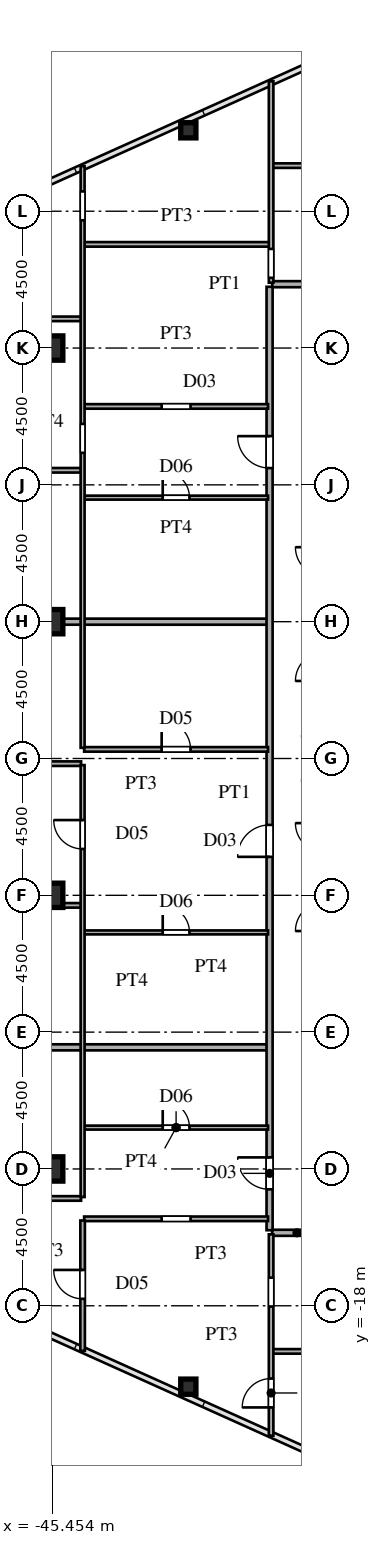
"""IFC4 building model, lengths in metres.
Left out: names, types, materials, properties, quantities, classifications, styles, units other than length and angle.
Written with IfcOpenShell. Run it as: python <this file> out.ifc"""

import sys

from ifc_helpers import new_model, si_unit, direction, frame, frame_2d, origin, origin_2d, place, context, subcontext, project, spatial, rectangle, hollow_rectangle, i_section, extrude, source, transform, mapped, element, fill, save


model = new_model("IFC4")
c1 = context("Model", 3, precision=1e-05, world=origin(), true_north=direction((0.0, 1.0)))
c2 = subcontext(c1, "Body", "Model", "MODEL_VIEW")
j1 = project(units=[si_unit("LENGTHUNIT", "METRE"), si_unit("PLANEANGLEUNIT", "RADIAN")], contexts=[c1])
p1 = place(None, origin())
s1 = spatial("IfcSite", under=j1, at=p1, CompositionType="ELEMENT")
p2 = place(p1, origin())
s2 = spatial("IfcBuilding", under=s1, at=p2, CompositionType="ELEMENT")
p3 = place(p2, frame((0.0, 0.0, 69.3)))
s3 = spatial("IfcBuildingStorey", under=s2, at=p3, CompositionType="ELEMENT", Elevation=69.3)
m1 = source(origin(), c2, "Body", "SweptSolid", [
    extrude(i_section(OverallWidth=0.8, OverallDepth=0.8, WebThickness=0.032, FlangeThickness=0.05, at=origin_2d()), origin(), (0.0, 0.0, 1.0), 3.6),
])
for number, where, z_axis, x_axis in (
    (1, (-45.5, -13.5, 0.0), (0.0, 0.0, 1.0), (1.0, 0.0, 0.0)),
    (2, (-45.5, -4.5, 0.0), (0.0, 0.0, 1.0), (1.0, 0.0, 0.0)),
    (3, (-45.5, 4.5, 0.0), (0.0, 0.0, 1.0), (1.0, 0.0, 0.0)),
    (4, (-45.5, 13.5, 0.0), (0.0, 0.0, 1.0), (1.0, 0.0, 0.0)),
):
    element("IfcColumn", number, at=place(p3, frame(where, z_axis=z_axis, x_axis=x_axis)), inside=s3, PredefinedType="COLUMN", context=c2, shape_type="MappedRepresentation", body=[
        mapped(m1, transform((0.0, 0.0, 0.0), scale=1.0)),
    ])
m2 = source(origin(), c2, "Body", "SweptSolid", [
    extrude(hollow_rectangle(XDim=0.5, YDim=0.5, WallThickness=0.02, at=origin_2d()), origin(), (0.0, 0.0, 1.0), 3.6),
])
for number, where, z_axis, x_axis in (
    (5, (-40.973, -20.661, 0.0), (0.0, 0.0, 1.0), (1.0, 0.0, 0.0)),
    (6, (-40.973, 20.661, 0.0), (0.0, 0.0, 1.0), (1.0, 0.0, 0.0)),
):
    element("IfcColumn", number, at=place(p3, frame(where, z_axis=z_axis, x_axis=x_axis)), inside=s3, PredefinedType="COLUMN", context=c2, shape_type="MappedRepresentation", body=[
        mapped(m2, transform((0.0, 0.0, 0.0), scale=1.0)),
    ])
p4 = place(p3, frame((-38.2, -19.5, 0.0), z_axis=(0.0, 0.0, 1.0), x_axis=(1.0, 0.0, 0.0)))
e7 = element("IfcWall", 7, at=p4, inside=s3, PredefinedType="PARTITIONING", context=c2, shape_type="SweptSolid", body=[
    extrude(rectangle(XDim=10.735, YDim=0.15, at=frame_2d((5.367, 0.0))), origin(), (0.0, 0.0, 1.0), 3.38),
])
p5 = place(p3, frame((-38.215, -15.6, 0.0), z_axis=(0.0, 0.0, 1.0), x_axis=(1.0, 0.0, 0.0)))
e8 = element("IfcWall", 8, at=p5, inside=s3, PredefinedType="PARTITIONING", context=c2, shape_type="SweptSolid", body=[
    extrude(rectangle(XDim=1.63, YDim=0.2, at=frame_2d((0.815, 0.0))), origin(), (0.0, 0.0, 1.0), 3.38),
])
p6 = place(p3, frame((-44.4, -15.14, 0.0), z_axis=(0.0, 0.0, 1.0), x_axis=(1.0, 0.0, 0.0)))
e9 = element("IfcWall", 9, at=p6, inside=s3, PredefinedType="PARTITIONING", context=c2, shape_type="SweptSolid", body=[
    extrude(rectangle(XDim=6.05, YDim=0.15, at=frame_2d((3.025, 0.0))), origin(), (0.0, 0.0, 1.0), 3.38),
])
p7 = place(p6, frame((2.55, 0.0, 0.0)))
e10 = element("IfcOpeningElement", 10, at=p7, cuts=e9, PredefinedType="OPENING", context=c2, shape_type="SweptSolid", body=[
    extrude(rectangle(XDim=0.95, YDim=2.15, at=frame_2d((0.475, 1.075))), frame((0.0, 0.085, 0.0), z_axis=(0.0, -1.0, 0.0), x_axis=(1.0, 0.0, 0.0)), (0.0, 0.0, 1.0), 0.17),
])
p8 = place(p3, frame((-54.45, -14.47, 0.0), z_axis=(0.0, 0.0, 1.0), x_axis=(1.0, 0.0, 0.0)))
e11 = element("IfcWall", 11, at=p8, inside=s3, PredefinedType="PARTITIONING", context=c2, shape_type="SweptSolid", body=[
    extrude(rectangle(XDim=9.95, YDim=0.15, at=frame_2d((4.975, 0.0))), origin(), (0.0, 0.0, 1.0), 3.38),
])
p9 = place(p8, frame((4.5, 0.0, 0.0)))
e12 = element("IfcOpeningElement", 12, at=p9, cuts=e11, PredefinedType="OPENING", context=c2, shape_type="SweptSolid", body=[
    extrude(rectangle(XDim=0.95, YDim=2.15, at=frame_2d((0.475, 1.075))), frame((0.0, 0.085, 0.0), z_axis=(0.0, -1.0, 0.0), x_axis=(1.0, 0.0, 0.0)), (0.0, 0.0, 1.0), 0.17),
])
p10 = place(p3, frame((-44.4, -12.14, 0.0), z_axis=(0.0, 0.0, 1.0), x_axis=(1.0, 0.0, 0.0)))
e13 = element("IfcWall", 13, at=p10, inside=s3, PredefinedType="PARTITIONING", context=c2, shape_type="SweptSolid", body=[
    extrude(rectangle(XDim=6.05, YDim=0.13, at=frame_2d((3.025, 0.0))), origin(), (0.0, 0.0, 1.0), 3.38),
])
p11 = place(p10, frame((2.585, 0.0, 0.0)))
e14 = element("IfcOpeningElement", 14, at=p11, cuts=e13, PredefinedType="OPENING", context=c2, shape_type="SweptSolid", body=[
    extrude(rectangle(XDim=0.88, YDim=2.1, at=frame_2d((0.44, 1.05))), frame((0.0, 0.075, 0.0), z_axis=(0.0, -1.0, 0.0), x_axis=(1.0, 0.0, 0.0)), (0.0, 0.0, 1.0), 0.15),
])
p12 = place(p3, frame((-66.568, -9.5, 0.0), z_axis=(0.0, 0.0, 1.0), x_axis=(1.0, 0.0, 0.0)))
e15 = element("IfcWall", 15, at=p12, inside=s3, PredefinedType="PARTITIONING", context=c2, shape_type="SweptSolid", body=[
    extrude(rectangle(XDim=28.188, YDim=0.2, at=frame_2d((14.094, 0.0))), origin(), (0.0, 0.0, 1.0), 3.38),
])
p13 = place(p3, frame((-44.4, -5.72, 0.0), z_axis=(0.0, 0.0, 1.0), x_axis=(1.0, 0.0, 0.0)))
e16 = element("IfcWall", 16, at=p13, inside=s3, PredefinedType="PARTITIONING", context=c2, shape_type="SweptSolid", body=[
    extrude(rectangle(XDim=6.05, YDim=0.13, at=frame_2d((3.025, 0.0))), origin(), (0.0, 0.0, 1.0), 3.38),
])
p14 = place(p13, frame((2.585, 0.0, 0.0)))
e17 = element("IfcOpeningElement", 17, at=p14, cuts=e16, PredefinedType="OPENING", context=c2, shape_type="SweptSolid", body=[
    extrude(rectangle(XDim=0.88, YDim=2.1, at=frame_2d((0.44, 1.05))), frame((0.0, 0.075, 0.0), z_axis=(0.0, -1.0, 0.0), x_axis=(1.0, 0.0, 0.0)), (0.0, 0.0, 1.0), 0.15),
])
p15 = place(p3, frame((-71.035, -4.83, 0.0), z_axis=(0.0, 0.0, 1.0), x_axis=(1.0, 0.0, 0.0)))
e18 = element("IfcWall", 18, at=p15, inside=s3, PredefinedType="PARTITIONING", context=c2, shape_type="SweptSolid", body=[
    extrude(rectangle(XDim=26.535, YDim=0.15, at=frame_2d((13.268, 0.0))), origin(), (0.0, 0.0, 1.0), 3.38),
])
p16 = place(p15, frame((21.085, 0.0, 0.0)))
e19 = element("IfcOpeningElement", 19, at=p16, cuts=e18, PredefinedType="OPENING", context=c2, shape_type="SweptSolid", body=[
    extrude(rectangle(XDim=0.95, YDim=2.15, at=frame_2d((0.475, 1.075))), frame((0.0, 0.085, 0.0), z_axis=(0.0, -1.0, 0.0), x_axis=(1.0, 0.0, 0.0)), (0.0, 0.0, 1.0), 0.17),
])
p17 = place(p15, frame((13.21, 0.0, 0.0)))
e20 = element("IfcOpeningElement", 20, at=p17, cuts=e18, PredefinedType="OPENING", context=c2, shape_type="SweptSolid", body=[
    extrude(rectangle(XDim=0.95, YDim=2.15, at=frame_2d((0.475, 1.075))), frame((0.0, 0.085, 0.0), z_axis=(0.0, -1.0, 0.0), x_axis=(1.0, 0.0, 0.0)), (0.0, 0.0, 1.0), 0.17),
])
p18 = place(p3, frame((-71.035, -0.17, 0.0), z_axis=(0.0, 0.0, 1.0), x_axis=(1.0, 0.0, 0.0)))
e21 = element("IfcWall", 21, at=p18, inside=s3, PredefinedType="PARTITIONING", context=c2, shape_type="SweptSolid", body=[
    extrude(rectangle(XDim=26.535, YDim=0.15, at=frame_2d((13.268, 0.0))), origin(), (0.0, 0.0, 1.0), 3.38),
])
p19 = place(p18, frame((21.085, 0.0, 0.0)))
e22 = element("IfcOpeningElement", 22, at=p19, cuts=e21, PredefinedType="OPENING", context=c2, shape_type="SweptSolid", body=[
    extrude(rectangle(XDim=0.95, YDim=2.15, at=frame_2d((0.475, 1.075))), frame((0.0, 0.085, 0.0), z_axis=(0.0, -1.0, 0.0), x_axis=(1.0, 0.0, 0.0)), (0.0, 0.0, 1.0), 0.17),
])
p20 = place(p18, frame((13.21, 0.0, 0.0)))
e23 = element("IfcOpeningElement", 23, at=p20, cuts=e21, PredefinedType="OPENING", context=c2, shape_type="SweptSolid", body=[
    extrude(rectangle(XDim=0.95, YDim=2.15, at=frame_2d((0.475, 1.075))), frame((0.0, 0.085, 0.0), z_axis=(0.0, -1.0, 0.0), x_axis=(1.0, 0.0, 0.0)), (0.0, 0.0, 1.0), 0.17),
])
p21 = place(p3, frame((-44.4, 0.3, 0.0), z_axis=(0.0, 0.0, 1.0), x_axis=(1.0, 0.0, 0.0)))
e24 = element("IfcWall", 24, at=p21, inside=s3, PredefinedType="PARTITIONING", context=c2, shape_type="SweptSolid", body=[
    extrude(rectangle(XDim=6.05, YDim=0.15, at=frame_2d((3.025, 0.0))), origin(), (0.0, 0.0, 1.0), 3.38),
])
p22 = place(p21, frame((2.55, 0.0, 0.0)))
e25 = element("IfcOpeningElement", 25, at=p22, cuts=e24, PredefinedType="OPENING", context=c2, shape_type="SweptSolid", body=[
    extrude(rectangle(XDim=0.95, YDim=2.15, at=frame_2d((0.475, 1.075))), frame((0.0, 0.085, 0.0), z_axis=(0.0, -1.0, 0.0), x_axis=(1.0, 0.0, 0.0)), (0.0, 0.0, 1.0), 0.17),
])
p23 = place(p3, frame((-54.52, 4.5, 0.0), z_axis=(0.0, 0.0, 1.0), x_axis=(1.0, 0.0, 0.0)))
e26 = element("IfcWall", 26, at=p23, inside=s3, PredefinedType="PARTITIONING", context=c2, shape_type="SweptSolid", body=[
    extrude(rectangle(XDim=16.14, YDim=0.2, at=frame_2d((8.07, 0.0))), origin(), (0.0, 0.0, 1.0), 2.68),
])
p24 = place(p3, frame((-44.4, 8.58, 0.0), z_axis=(0.0, 0.0, 1.0), x_axis=(1.0, 0.0, 0.0)))
e27 = element("IfcWall", 27, at=p24, inside=s3, PredefinedType="PARTITIONING", context=c2, shape_type="SweptSolid", body=[
    extrude(rectangle(XDim=6.05, YDim=0.13, at=frame_2d((3.025, 0.0))), origin(), (0.0, 0.0, 1.0), 3.38),
])
p25 = place(p24, frame((2.585, 0.0, 0.0)))
e28 = element("IfcOpeningElement", 28, at=p25, cuts=e27, PredefinedType="OPENING", context=c2, shape_type="SweptSolid", body=[
    extrude(rectangle(XDim=0.88, YDim=2.1, at=frame_2d((0.44, 1.05))), frame((0.0, 0.075, 0.0), z_axis=(0.0, -1.0, 0.0), x_axis=(1.0, 0.0, 0.0)), (0.0, 0.0, 1.0), 0.15),
])
p26 = place(p3, frame((-66.629, 9.48, 0.0), z_axis=(0.0, 0.0, 1.0), x_axis=(1.0, 0.0, 0.0)))
e29 = element("IfcWall", 29, at=p26, inside=s3, PredefinedType="PARTITIONING", context=c2, shape_type="SweptSolid", body=[
    extrude(rectangle(XDim=22.129, YDim=0.15, at=frame_2d((11.064, 0.0))), origin(), (0.0, 0.0, 1.0), 3.38),
])
p27 = place(p26, frame((16.679, 0.0, 0.0)))
e30 = element("IfcOpeningElement", 30, at=p27, cuts=e29, PredefinedType="OPENING", context=c2, shape_type="SweptSolid", body=[
    extrude(rectangle(XDim=0.95, YDim=2.15, at=frame_2d((0.475, 1.075))), frame((0.0, 0.085, 0.0), z_axis=(0.0, -1.0, 0.0), x_axis=(1.0, 0.0, 0.0)), (0.0, 0.0, 1.0), 0.17),
])
p28 = place(p3, frame((-44.4, 11.58, 0.0), z_axis=(0.0, 0.0, 1.0), x_axis=(1.0, 0.0, 0.0)))
e31 = element("IfcWall", 31, at=p28, inside=s3, PredefinedType="PARTITIONING", context=c2, shape_type="SweptSolid", body=[
    extrude(rectangle(XDim=6.05, YDim=0.15, at=frame_2d((3.025, 0.0))), origin(), (0.0, 0.0, 1.0), 3.38),
])
p29 = place(p28, frame((2.55, 0.0, 0.0)))
e32 = element("IfcOpeningElement", 32, at=p29, cuts=e31, PredefinedType="OPENING", context=c2, shape_type="SweptSolid", body=[
    extrude(rectangle(XDim=0.95, YDim=2.15, at=frame_2d((0.475, 1.075))), frame((0.0, 0.085, 0.0), z_axis=(0.0, -1.0, 0.0), x_axis=(1.0, 0.0, 0.0)), (0.0, 0.0, 1.0), 0.17),
])
p30 = place(p3, frame((-54.45, 14.46, 0.0), z_axis=(0.0, 0.0, 1.0), x_axis=(1.0, 0.0, 0.0)))
e33 = element("IfcWall", 33, at=p30, inside=s3, PredefinedType="PARTITIONING", context=c2, shape_type="SweptSolid", body=[
    extrude(rectangle(XDim=9.95, YDim=0.15, at=frame_2d((4.975, 0.0))), origin(), (0.0, 0.0, 1.0), 3.38),
])
p31 = place(p30, frame((4.5, 0.0, 0.0)))
e34 = element("IfcOpeningElement", 34, at=p31, cuts=e33, PredefinedType="OPENING", context=c2, shape_type="SweptSolid", body=[
    extrude(rectangle(XDim=0.95, YDim=2.15, at=frame_2d((0.475, 1.075))), frame((0.0, 0.085, 0.0), z_axis=(0.0, -1.0, 0.0), x_axis=(1.0, 0.0, 0.0)), (0.0, 0.0, 1.0), 0.17),
])
p32 = place(p3, frame((-38.215, 15.6, 0.0), z_axis=(0.0, 0.0, 1.0), x_axis=(1.0, 0.0, 0.0)))
e35 = element("IfcWall", 35, at=p32, inside=s3, PredefinedType="PARTITIONING", context=c2, shape_type="SweptSolid", body=[
    extrude(rectangle(XDim=1.63, YDim=0.2, at=frame_2d((0.815, 0.0))), origin(), (0.0, 0.0, 1.0), 3.38),
])
p33 = place(p3, frame((-44.4, 16.91, 0.0), z_axis=(0.0, 0.0, 1.0), x_axis=(1.0, 0.0, 0.0)))
e36 = element("IfcWall", 36, at=p33, inside=s3, PredefinedType="PARTITIONING", context=c2, shape_type="SweptSolid", body=[
    extrude(rectangle(XDim=6.1, YDim=0.15, at=frame_2d((3.05, 0.0))), origin(), (0.0, 0.0, 1.0), 3.38),
])
p34 = place(p3, frame((-38.2, 19.5, 0.0), z_axis=(0.0, 0.0, 1.0), x_axis=(1.0, 0.0, 0.0)))
e37 = element("IfcWall", 37, at=p34, inside=s3, PredefinedType="PARTITIONING", context=c2, shape_type="SweptSolid", body=[
    extrude(rectangle(XDim=10.735, YDim=0.15, at=frame_2d((5.367, 0.0))), origin(), (0.0, 0.0, 1.0), 3.38),
])
p35 = place(p34, frame((4.85, 0.0, 0.0)))
e38 = element("IfcOpeningElement", 38, at=p35, cuts=e37, PredefinedType="OPENING", context=c2, shape_type="SweptSolid", body=[
    extrude(rectangle(XDim=0.95, YDim=2.15, at=frame_2d((0.475, 1.075))), frame((0.0, 0.085, 0.0), z_axis=(0.0, -1.0, 0.0), x_axis=(1.0, 0.0, 0.0)), (0.0, 0.0, 1.0), 0.17),
])
p36 = place(p3, frame((-44.45, -19.483, 0.0), z_axis=(0.0, 0.0, 1.0), x_axis=(0.0, 1.0, 0.0)))
e39 = element("IfcWall", 39, at=p36, inside=s3, PredefinedType="PARTITIONING", context=c2, shape_type="SweptSolid", body=[
    extrude(rectangle(XDim=4.288, YDim=0.15, at=frame_2d((2.144, 0.0))), origin(), (0.0, 0.0, 1.0), 3.38),
])
p37 = place(p36, frame((1.712, 0.0, 0.0)))
e40 = element("IfcOpeningElement", 40, at=p37, cuts=e39, PredefinedType="OPENING", context=c2, shape_type="SweptSolid", body=[
    extrude(rectangle(XDim=0.95, YDim=2.15, at=frame_2d((0.475, 1.075))), frame((0.0, 0.085, 0.0), z_axis=(0.0, -1.0, 0.0), x_axis=(1.0, 0.0, 0.0)), (0.0, 0.0, 1.0), 0.17),
])
p38 = place(p3, frame((-44.45, -14.424, 0.0), z_axis=(0.0, 0.0, 1.0), x_axis=(0.0, 1.0, 0.0)))
e41 = element("IfcWall", 41, at=p38, inside=s3, PredefinedType="PARTITIONING", context=c2, shape_type="SweptSolid", body=[
    extrude(rectangle(XDim=14.207, YDim=0.13, at=frame_2d((7.104, 0.0))), origin(), (0.0, 0.0, 1.0), 3.38),
])
p39 = place(p38, frame((11.449, 0.0, 0.0)))
e42 = element("IfcOpeningElement", 42, at=p39, cuts=e41, PredefinedType="OPENING", context=c2, shape_type="SweptSolid", body=[
    extrude(rectangle(XDim=0.95, YDim=2.15, at=frame_2d((0.475, 1.075))), frame((0.0, 0.075, 0.0), z_axis=(0.0, -1.0, 0.0), x_axis=(1.0, 0.0, 0.0)), (0.0, 0.0, 1.0), 0.15),
])
p40 = place(p3, frame((-44.45, 0.352, 0.0), z_axis=(0.0, 0.0, 1.0), x_axis=(0.0, 1.0, 0.0)))
e43 = element("IfcWall", 43, at=p40, inside=s3, PredefinedType="PARTITIONING", context=c2, shape_type="SweptSolid", body=[
    extrude(rectangle(XDim=19.131, YDim=0.13, at=frame_2d((9.565, 0.0))), origin(), (0.0, 0.0, 1.0), 3.38),
])
p41 = place(p40, frame((9.703, 0.0, 0.0)))
e44 = element("IfcOpeningElement", 44, at=p41, cuts=e43, PredefinedType="OPENING", context=c2, shape_type="SweptSolid", body=[
    extrude(rectangle(XDim=0.95, YDim=2.15, at=frame_2d((0.475, 1.075))), frame((0.0, 0.075, 0.0), z_axis=(0.0, -1.0, 0.0), x_axis=(1.0, 0.0, 0.0)), (0.0, 0.0, 1.0), 0.15),
])
p42 = place(p40, frame((17.351, 0.0, 0.0)))
e45 = element("IfcOpeningElement", 45, at=p42, cuts=e43, PredefinedType="OPENING", context=c2, shape_type="SweptSolid", body=[
    extrude(rectangle(XDim=0.95, YDim=2.15, at=frame_2d((0.475, 1.075))), frame((0.0, 0.075, 0.0), z_axis=(0.0, -1.0, 0.0), x_axis=(1.0, 0.0, 0.0)), (0.0, 0.0, 1.0), 0.15),
])
p43 = place(p3, frame((-38.3, -15.515, 0.0), z_axis=(0.0, 0.0, 1.0), x_axis=(0.0, 1.0, 0.0)))
e46 = element("IfcWall", 46, at=p43, inside=s3, PredefinedType="PARTITIONING", context=c2, shape_type="SweptSolid", body=[
    extrude(rectangle(XDim=31.03, YDim=0.2, at=frame_2d((15.515, 0.0))), origin(), (0.0, 0.0, 1.0), 3.38),
])
p44 = place(p43, frame((1.345, 0.0, 0.0)))
e47 = element("IfcOpeningElement", 47, at=p44, cuts=e46, PredefinedType="OPENING", context=c2, shape_type="SweptSolid", body=[
    extrude(rectangle(XDim=1.05, YDim=2.25, at=frame_2d((0.525, 1.125))), frame((0.0, 0.11, 0.0), z_axis=(0.0, -1.0, 0.0), x_axis=(1.0, 0.0, 0.0)), (0.0, 0.0, 1.0), 0.22),
])
p45 = place(p43, frame((12.28, 0.0, 0.0)))
e48 = element("IfcOpeningElement", 48, at=p45, cuts=e46, PredefinedType="OPENING", context=c2, shape_type="SweptSolid", body=[
    extrude(rectangle(XDim=1.05, YDim=2.25, at=frame_2d((0.525, 1.125))), frame((0.0, 0.11, 0.0), z_axis=(0.0, -1.0, 0.0), x_axis=(1.0, 0.0, 0.0)), (0.0, 0.0, 1.0), 0.22),
])
p46 = place(p43, frame((25.067, 0.0, 0.0)))
e49 = element("IfcOpeningElement", 49, at=p46, cuts=e46, PredefinedType="OPENING", context=c2, shape_type="SweptSolid", body=[
    extrude(rectangle(XDim=1.05, YDim=2.25, at=frame_2d((0.525, 1.125))), frame((0.0, 0.11, 0.0), z_axis=(0.0, -1.0, 0.0), x_axis=(1.0, 0.0, 0.0)), (0.0, 0.0, 1.0), 0.22),
])
p47 = place(p3, frame((-38.25, -22.273, 0.0), z_axis=(0.0, 0.0, 1.0), x_axis=(0.0, 1.0, 0.0)))
e50 = element("IfcWall", 50, at=p47, inside=s3, PredefinedType="PARTITIONING", context=c2, shape_type="SweptSolid", body=[
    extrude(rectangle(XDim=6.623, YDim=0.15, at=frame_2d((3.312, 0.0))), origin(), (0.0, 0.0, 1.0), 3.38),
])
p48 = place(p47, frame((0.929, 0.0, 0.0)))
e51 = element("IfcOpeningElement", 51, at=p48, cuts=e50, PredefinedType="OPENING", context=c2, shape_type="SweptSolid", body=[
    extrude(rectangle(XDim=0.95, YDim=2.15, at=frame_2d((0.475, 1.075))), frame((0.0, 0.085, 0.0), z_axis=(0.0, -1.0, 0.0), x_axis=(1.0, 0.0, 0.0)), (0.0, 0.0, 1.0), 0.17),
])
p49 = place(p47, frame((4.248, 0.0, 0.0)))
e52 = element("IfcOpeningElement", 52, at=p49, cuts=e50, PredefinedType="OPENING", context=c2, shape_type="SweptSolid", body=[
    extrude(rectangle(XDim=0.95, YDim=2.15, at=frame_2d((0.475, 1.075))), frame((0.0, 0.085, 0.0), z_axis=(0.0, -1.0, 0.0), x_axis=(1.0, 0.0, 0.0)), (0.0, 0.0, 1.0), 0.17),
])
p50 = place(p3, frame((-38.25, 15.65, 0.0), z_axis=(0.0, 0.0, 1.0), x_axis=(0.0, 1.0, 0.0)))
e53 = element("IfcWall", 53, at=p50, inside=s3, PredefinedType="PARTITIONING", context=c2, shape_type="SweptSolid", body=[
    extrude(rectangle(XDim=6.623, YDim=0.15, at=frame_2d((3.312, 0.0))), origin(), (0.0, 0.0, 1.0), 3.38),
])
p51 = place(p50, frame((0.16, 0.0, 0.0)))
e54 = element("IfcOpeningElement", 54, at=p51, cuts=e53, PredefinedType="OPENING", context=c2, shape_type="SweptSolid", body=[
    extrude(rectangle(XDim=0.95, YDim=2.15, at=frame_2d((0.475, 1.075))), frame((0.0, 0.085, 0.0), z_axis=(0.0, -1.0, 0.0), x_axis=(1.0, 0.0, 0.0)), (0.0, 0.0, 1.0), 0.17),
])
m3 = source(origin(), c2, "Body", "SweptSolid", [
    extrude(rectangle(XDim=0.88, YDim=2.1, at=frame_2d((0.44, 1.05))), frame((0.0, 0.025, 0.0), z_axis=(0.0, -1.0, 0.0), x_axis=(1.0, 0.0, 0.0)), (0.0, 0.0, 1.0), 0.05),
])
p52 = place(p11, origin())
e55 = element("IfcDoor", 55, at=p52, inside=s3, OperationType="SINGLE_SWING_LEFT", PredefinedType="DOOR", context=c2, shape_type="MappedRepresentation", body=[
    mapped(m3, transform((0.0, 0.0, 0.0), scale=1.0)),
])
fill(e14, e55)
p53 = place(p14, origin())
e56 = element("IfcDoor", 56, at=p53, inside=s3, OperationType="SINGLE_SWING_LEFT", PredefinedType="DOOR", context=c2, shape_type="MappedRepresentation", body=[
    mapped(m3, transform((0.0, 0.0, 0.0), scale=1.0)),
])
fill(e17, e56)
m4 = source(origin(), c2, "Body", "SweptSolid", [
    extrude(rectangle(XDim=0.95, YDim=2.15, at=frame_2d((0.475, 1.075))), frame((0.0, 0.025, 0.0), z_axis=(0.0, -1.0, 0.0), x_axis=(1.0, 0.0, 0.0)), (0.0, 0.0, 1.0), 0.05),
])
p54 = place(p22, origin())
e57 = element("IfcDoor", 57, at=p54, inside=s3, OperationType="SINGLE_SWING_LEFT", PredefinedType="DOOR", context=c2, shape_type="MappedRepresentation", body=[
    mapped(m4, transform((0.0, 0.0, 0.0), scale=1.0)),
])
fill(e25, e57)
p55 = place(p25, origin())
e58 = element("IfcDoor", 58, at=p55, inside=s3, OperationType="SINGLE_SWING_LEFT", PredefinedType="DOOR", context=c2, shape_type="MappedRepresentation", body=[
    mapped(m3, transform((0.0, 0.0, 0.0), scale=1.0)),
])
fill(e28, e58)
p56 = place(p37, origin())
e59 = element("IfcDoor", 59, at=p56, inside=s3, OperationType="SINGLE_SWING_RIGHT", PredefinedType="DOOR", context=c2, shape_type="MappedRepresentation", body=[
    mapped(m4, transform((0.0, 0.0, 0.0), scale=1.0)),
])
fill(e40, e59)
p57 = place(p39, origin())
e60 = element("IfcDoor", 60, at=p57, inside=s3, OperationType="SINGLE_SWING_RIGHT", PredefinedType="DOOR", context=c2, shape_type="MappedRepresentation", body=[
    mapped(m4, transform((0.0, 0.0, 0.0), scale=1.0)),
])
fill(e42, e60)
m5 = source(origin(), c2, "Body", "SweptSolid", [
    extrude(rectangle(XDim=1.05, YDim=2.25, at=frame_2d((0.525, 1.125))), frame((0.0, 0.025, 0.0), z_axis=(0.0, -1.0, 0.0), x_axis=(1.0, 0.0, 0.0)), (0.0, 0.0, 1.0), 0.05),
])
p58 = place(p44, origin())
e61 = element("IfcDoor", 61, at=p58, inside=s3, OperationType="SINGLE_SWING_RIGHT", PredefinedType="DOOR", context=c2, shape_type="MappedRepresentation", body=[
    mapped(m5, transform((0.0, 0.0, 0.0), scale=1.0)),
])
fill(e47, e61)
p59 = place(p45, origin())
e62 = element("IfcDoor", 62, at=p59, inside=s3, OperationType="SINGLE_SWING_LEFT", PredefinedType="DOOR", context=c2, shape_type="MappedRepresentation", body=[
    mapped(m5, transform((0.0, 0.0, 0.0), scale=1.0)),
])
fill(e48, e62)
p60 = place(p46, origin())
e63 = element("IfcDoor", 63, at=p60, inside=s3, OperationType="SINGLE_SWING_RIGHT", PredefinedType="DOOR", context=c2, shape_type="MappedRepresentation", body=[
    mapped(m5, transform((0.0, 0.0, 0.0), scale=1.0)),
])
fill(e49, e63)
p61 = place(p48, origin())
e64 = element("IfcDoor", 64, at=p61, inside=s3, OperationType="SINGLE_SWING_LEFT", PredefinedType="DOOR", context=c2, shape_type="MappedRepresentation", body=[
    mapped(m4, transform((0.0, 0.0, 0.0), scale=1.0)),
])
fill(e51, e64)
save(model, sys.argv[1])
